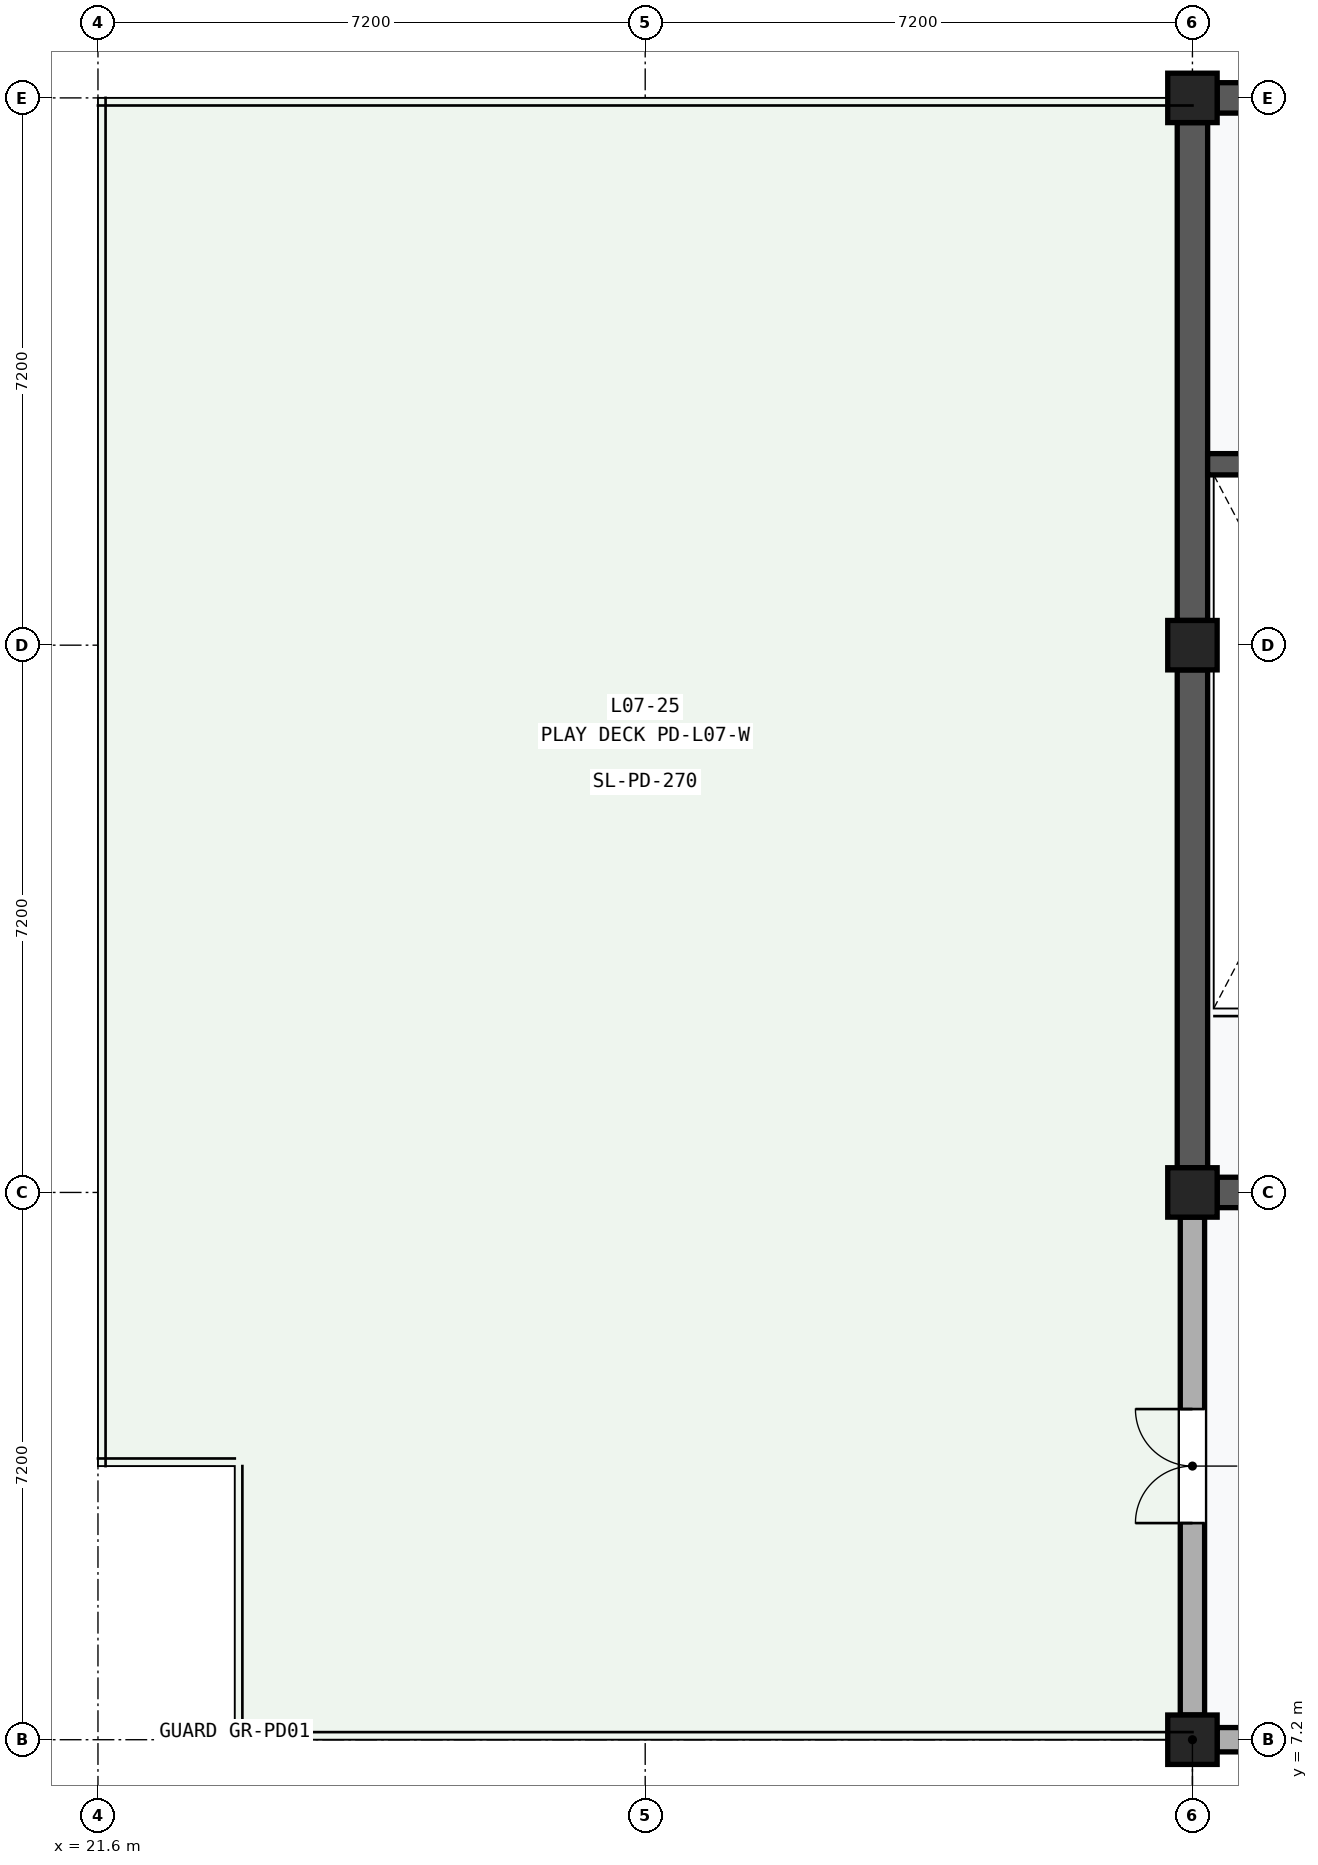
"""IFC4 building model, lengths in metres.
Left out: names, types, materials, properties, quantities, classifications, styles, units other than length and angle.
Written with IfcOpenShell. Run it as: python <this file> out.ifc"""

import sys

from ifc_helpers import new_model, si_unit, direction, frame, frame_2d, origin, origin_2d, place, context, subcontext, project, spatial, rectangle, extrude, element, fill, save


model = new_model("IFC4")
c1 = context("Model", 3, precision=1e-05, world=origin(), true_north=direction((0.0, 1.0)))
c2 = subcontext(c1, "Body", "Model", "MODEL_VIEW")
j1 = project(units=[si_unit("LENGTHUNIT", "METRE"), si_unit("PLANEANGLEUNIT", "RADIAN")], contexts=[c1])
p1 = place(None, origin())
s1 = spatial("IfcSite", under=j1, at=p1, CompositionType="ELEMENT")
p2 = place(p1, origin())
s2 = spatial("IfcBuilding", under=s1, at=p2, CompositionType="ELEMENT")
p3 = place(p2, frame((0.0, 0.0, 30.6)))
s3 = spatial("IfcBuildingStorey", under=s2, at=p3, CompositionType="ELEMENT", Elevation=30.6)
for number, where, z_axis, x_axis in (
    (1, (36.0, 7.2, 0.0), (0.0, 0.0, 1.0), (1.0, 0.0, 0.0)),
    (2, (36.0, 14.4, 0.0), (0.0, 0.0, 1.0), (1.0, 0.0, 0.0)),
    (3, (36.0, 21.6, 0.0), (0.0, 0.0, 1.0), (1.0, 0.0, 0.0)),
    (4, (36.0, 28.8, 0.0), (0.0, 0.0, 1.0), (1.0, 0.0, 0.0)),
):
    element("IfcColumn", number, at=place(p3, frame(where, z_axis=z_axis, x_axis=x_axis)), inside=s3, PredefinedType="COLUMN", context=c2, shape_type="SweptSolid", body=[
        extrude(rectangle(XDim=0.65, YDim=0.65, at=origin_2d()), origin(), (0.0, 0.0, 1.0), 4.2),
    ])
p4 = place(p3, frame((36.325, 7.2, 0.0), z_axis=(0.0, 0.0, 1.0), x_axis=(1.0, 0.0, 0.0)))
e5 = element("IfcWall", 5, at=p4, inside=s3, PredefinedType="SOLIDWALL", context=c2, shape_type="SweptSolid", body=[
    extrude(rectangle(XDim=6.55, YDim=0.32, at=frame_2d((3.275, 0.0))), origin(), (0.0, 0.0, 1.0), 3.25),
])
p5 = place(p4, frame((1.975, 0.0, 0.9)))
e6 = element("IfcOpeningElement", 6, at=p5, cuts=e5, PredefinedType="OPENING", context=c2, shape_type="SweptSolid", body=[
    extrude(rectangle(XDim=2.6, YDim=1.8, at=frame_2d((1.3, 0.9))), frame((0.0, 0.172, 0.0), z_axis=(0.0, -1.0, 0.0), x_axis=(1.0, 0.0, 0.0)), (0.0, 0.0, 1.0), 0.344),
])
p6 = place(p3, frame((36.0, 7.525, 0.0), z_axis=(0.0, 0.0, 1.0), x_axis=(0.0, 1.0, 0.0)))
e7 = element("IfcWall", 7, at=p6, inside=s3, PredefinedType="SOLIDWALL", context=c2, shape_type="SweptSolid", body=[
    extrude(rectangle(XDim=6.55, YDim=0.32, at=frame_2d((3.275, 0.0))), origin(), (0.0, 0.0, 1.0), 3.25),
])
p7 = place(p6, frame((2.525, 0.0, 0.0)))
e8 = element("IfcOpeningElement", 8, at=p7, cuts=e7, PredefinedType="OPENING", context=c2, shape_type="SweptSolid", body=[
    extrude(rectangle(XDim=1.5, YDim=2.15, at=frame_2d((0.75, 1.075))), frame((0.0, 0.172, 0.0), z_axis=(0.0, -1.0, 0.0), x_axis=(1.0, 0.0, 0.0)), (0.0, 0.0, 1.0), 0.344),
])
p8 = place(p3, frame((36.0, 14.725, 0.0), z_axis=(0.0, 0.0, 1.0), x_axis=(0.0, 1.0, 0.0)))
e9 = element("IfcWall", 9, at=p8, inside=s3, PredefinedType="SHEAR", context=c2, shape_type="SweptSolid", body=[
    extrude(rectangle(XDim=6.55, YDim=0.4, at=frame_2d((3.275, 0.0))), origin(), (0.0, 0.0, 1.0), 3.25),
])
p9 = place(p3, frame((36.0, 21.925, 0.0), z_axis=(0.0, 0.0, 1.0), x_axis=(0.0, 1.0, 0.0)))
e10 = element("IfcWall", 10, at=p9, inside=s3, PredefinedType="SHEAR", context=c2, shape_type="SweptSolid", body=[
    extrude(rectangle(XDim=6.55, YDim=0.4, at=frame_2d((3.275, 0.0))), origin(), (0.0, 0.0, 1.0), 3.25),
])
p10 = place(p3, frame((36.325, 14.4, 0.0), z_axis=(0.0, 0.0, 1.0), x_axis=(1.0, 0.0, 0.0)))
e11 = element("IfcWall", 11, at=p10, inside=s3, PredefinedType="SHEAR", context=c2, shape_type="SweptSolid", body=[
    extrude(rectangle(XDim=6.525, YDim=0.4, at=frame_2d((3.263, 0.0))), origin(), (0.0, 0.0, 1.0), 3.11),
])
p11 = place(p10, frame((4.495, 0.0, 0.0)))
e12 = element("IfcOpeningElement", 12, at=p11, cuts=e11, PredefinedType="OPENING", context=c2, shape_type="SweptSolid", body=[
    extrude(rectangle(XDim=1.6, YDim=2.2, at=frame_2d((0.8, 1.1))), frame((0.0, 0.212, 0.0), z_axis=(0.0, -1.0, 0.0), x_axis=(1.0, 0.0, 0.0)), (0.0, 0.0, 1.0), 0.424),
])
p12 = place(p3, frame((36.325, 28.8, 0.0), z_axis=(0.0, 0.0, 1.0), x_axis=(1.0, 0.0, 0.0)))
e13 = element("IfcWall", 13, at=p12, inside=s3, PredefinedType="SHEAR", context=c2, shape_type="SweptSolid", body=[
    extrude(rectangle(XDim=6.625, YDim=0.4, at=frame_2d((3.312, 0.0))), origin(), (0.0, 0.0, 1.0), 3.25),
])
p13 = place(p3, frame((36.2, 23.98, 0.0), z_axis=(0.0, 0.0, 1.0), x_axis=(1.0, 0.0, 0.0)))
e14 = element("IfcWall", 14, at=p13, inside=s3, PredefinedType="SHEAR", context=c2, shape_type="SweptSolid", body=[
    extrude(rectangle(XDim=3.78, YDim=0.28, at=frame_2d((1.89, 0.0))), origin(), (0.0, 0.0, 1.0), 3.88),
])
p14 = place(p7, origin())
e15 = element("IfcDoor", 15, at=p14, inside=s3, OperationType="DOUBLE_DOOR_SINGLE_SWING", PredefinedType="DOOR", context=c2, shape_type="SweptSolid", body=[
    extrude(rectangle(XDim=1.5, YDim=2.15, at=frame_2d((0.75, 1.075))), frame((0.0, 0.025, 0.0), z_axis=(0.0, -1.0, 0.0), x_axis=(1.0, 0.0, 0.0)), (0.0, 0.0, 1.0), 0.05),
])
fill(e8, e15)
save(model, sys.argv[1])
